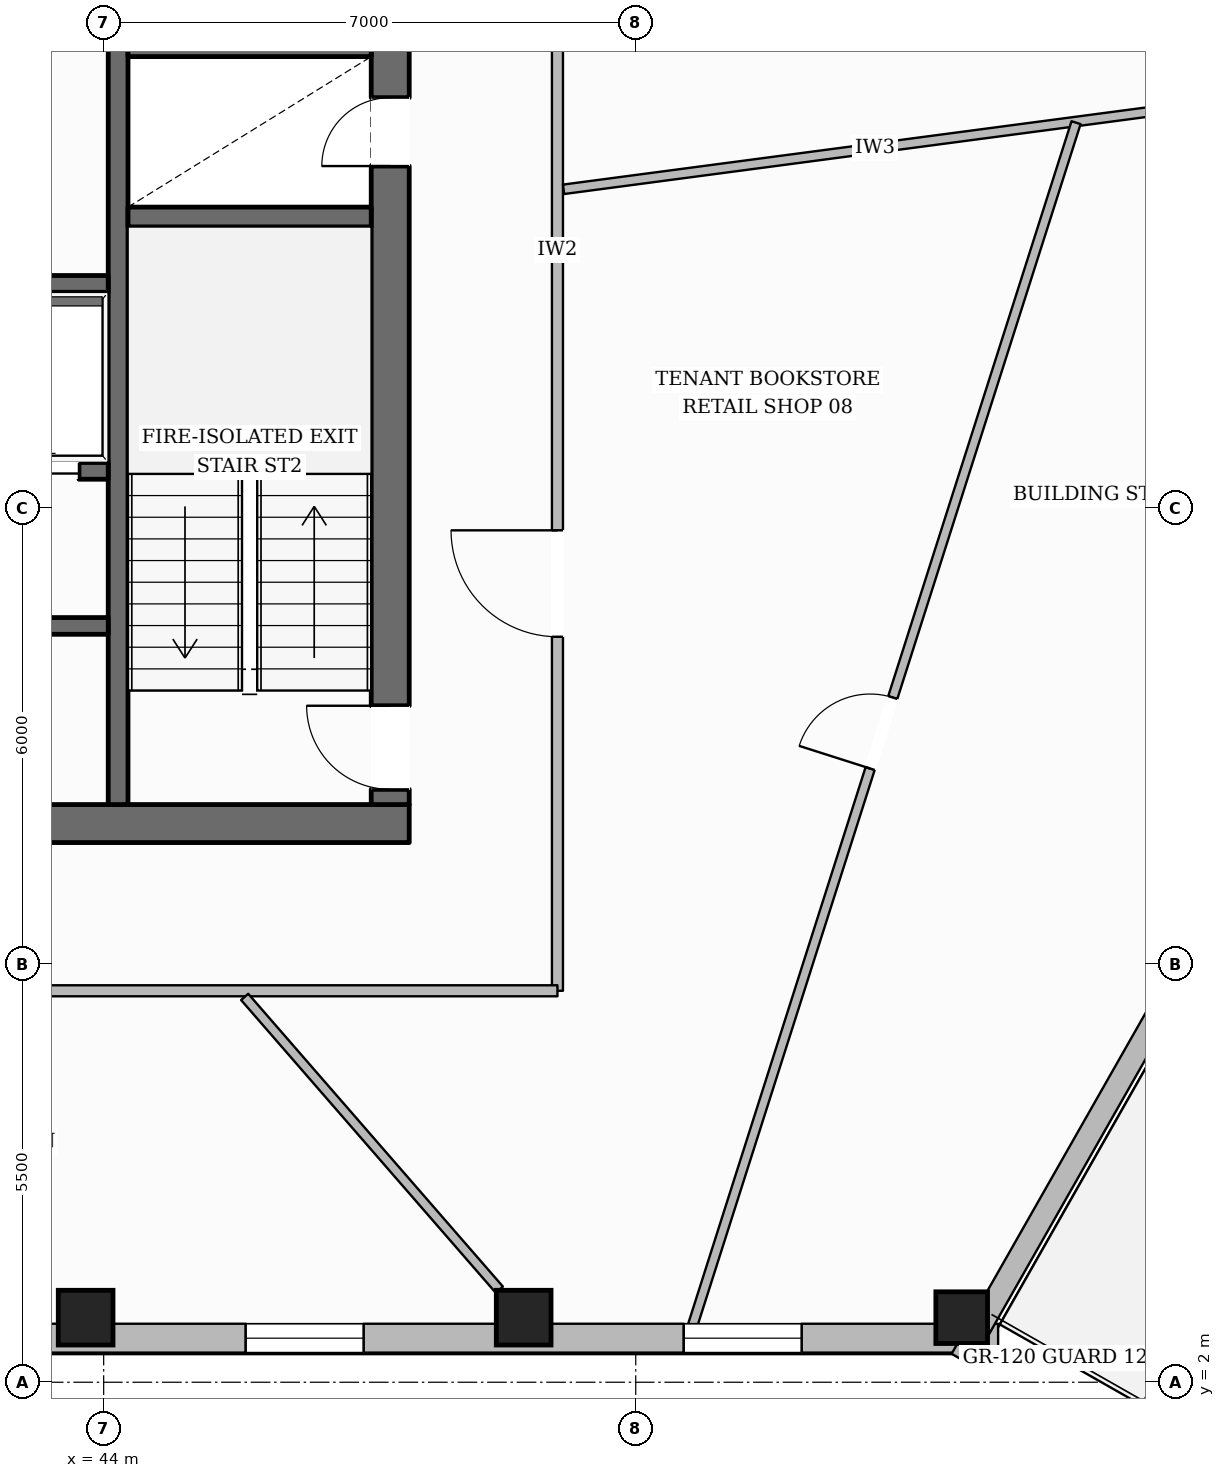
"""IFC4 building model, lengths in metres.
Left out: names, types, materials, properties, quantities, classifications, styles, units other than length and angle.
Written with IfcOpenShell. Run it as: python <this file> out.ifc"""

import sys

from ifc_helpers import new_model, si_unit, direction, frame, frame_2d, origin, origin_2d, place, context, subcontext, project, spatial, rectangle, hollow_rectangle, extrude, element, fill, save


model = new_model("IFC4")
c1 = context("Model", 3, precision=1e-05, world=origin(), true_north=direction((0.0, 1.0)))
c2 = subcontext(c1, "Body", "Model", "MODEL_VIEW")
j1 = project(units=[si_unit("LENGTHUNIT", "METRE"), si_unit("PLANEANGLEUNIT", "RADIAN")], contexts=[c1])
p1 = place(None, origin())
s1 = spatial("IfcSite", under=j1, at=p1, CompositionType="ELEMENT")
p2 = place(p1, origin())
s2 = spatial("IfcBuilding", under=s1, at=p2, CompositionType="ELEMENT")
p3 = place(p2, frame((0.0, 0.0, 93.2)))
s3 = spatial("IfcBuildingStorey", under=s2, at=p3, CompositionType="ELEMENT", Elevation=93.2)
p4 = place(p3, frame((27.98, 9.35, 0.0), z_axis=(0.0, 0.0, 1.0), x_axis=(1.0, 0.0, 0.0)))
e1 = element("IfcWall", 1, at=p4, inside=s3, PredefinedType="SOLIDWALL", context=c2, shape_type="SweptSolid", body=[
    extrude(rectangle(XDim=20.04, YDim=0.5, at=frame_2d((10.02, 0.0))), origin(), (0.0, 0.0, 1.0), 3.6),
])
p5 = place(p4, frame((10.52, 0.0, 0.0)))
e2 = element("IfcOpeningElement", 2, at=p5, cuts=e1, PredefinedType="OPENING", context=c2, shape_type="SweptSolid", body=[
    extrude(rectangle(XDim=1.4, YDim=2.2, at=frame_2d((0.7, 1.1))), frame((0.0, 0.26, 0.0), z_axis=(0.0, -1.0, 0.0), x_axis=(1.0, 0.0, 0.0)), (0.0, 0.0, 1.0), 0.52),
])
p6 = place(p3, frame((47.77, 9.6, 0.0), z_axis=(0.0, 0.0, 1.0), x_axis=(0.0, 1.0, 0.0)))
e3 = element("IfcWall", 3, at=p6, inside=s3, PredefinedType="SOLIDWALL", context=c2, shape_type="SweptSolid", body=[
    extrude(rectangle(XDim=13.0, YDim=0.5, at=frame_2d((6.5, 0.0))), origin(), (0.0, 0.0, 1.0), 3.6),
])
p7 = place(p6, frame((0.2, 0.0, 0.0)))
e4 = element("IfcOpeningElement", 4, at=p7, cuts=e3, PredefinedType="OPENING", context=c2, shape_type="SweptSolid", body=[
    extrude(rectangle(XDim=1.1, YDim=2.15, at=frame_2d((0.55, 1.075))), frame((0.0, 0.26, 0.0), z_axis=(0.0, -1.0, 0.0), x_axis=(1.0, 0.0, 0.0)), (0.0, 0.0, 1.0), 0.52),
])
p8 = place(p6, frame((8.4, 0.0, 0.0)))
e5 = element("IfcOpeningElement", 5, at=p8, cuts=e3, PredefinedType="OPENING", context=c2, shape_type="SweptSolid", body=[
    extrude(rectangle(XDim=0.9, YDim=2.1, at=frame_2d((0.45, 1.05))), frame((0.0, 0.26, 0.0), z_axis=(0.0, -1.0, 0.0), x_axis=(1.0, 0.0, 0.0)), (0.0, 0.0, 1.0), 0.52),
])
p9 = place(p3, frame((44.19, 9.6, 0.0), z_axis=(0.0, 0.0, 1.0), x_axis=(0.0, 1.0, 0.0)))
e6 = element("IfcWall", 6, at=p9, inside=s3, PredefinedType="SHEAR", context=c2, shape_type="SweptSolid", body=[
    extrude(rectangle(XDim=13.0, YDim=0.26, at=frame_2d((6.5, 0.0))), origin(), (0.0, 0.0, 1.0), 3.6),
])
p10 = place(p9, frame((10.925, 0.0, 0.0)))
e7 = element("IfcOpeningElement", 7, at=p10, cuts=e6, PredefinedType="OPENING", context=c2, shape_type="SweptSolid", body=[
    extrude(rectangle(XDim=1.25, YDim=2.25, at=frame_2d((0.625, 1.125))), frame((0.0, 0.14, 0.0), z_axis=(0.0, -1.0, 0.0), x_axis=(1.0, 0.0, 0.0)), (0.0, 0.0, 1.0), 0.28),
])
for number, where, z_axis, x_axis in (
    (8, (44.32, 17.33, 0.0), (0.0, 0.0, 1.0), (1.0, 0.0, 0.0)),
    (9, (44.32, 19.57, 0.0), (0.0, 0.0, 1.0), (1.0, 0.0, 0.0)),
):
    element("IfcWall", number, at=place(p3, frame(where, z_axis=z_axis, x_axis=x_axis)), inside=s3, PredefinedType="SHEAR", context=c2, shape_type="SweptSolid", body=[
        extrude(rectangle(XDim=3.2, YDim=0.26, at=frame_2d((1.6, 0.0))), origin(), (0.0, 0.0, 1.0), 3.6),
    ])
p11 = place(p3, frame((31.94, 16.45, 0.0), z_axis=(0.0, 0.0, 1.0), x_axis=(1.0, 0.0, 0.0)))
e10 = element("IfcWall", 10, at=p11, inside=s3, PredefinedType="SOLIDWALL", context=c2, shape_type="SweptSolid", body=[
    extrude(rectangle(XDim=12.12, YDim=0.22, at=frame_2d((6.06, 0.0))), origin(), (0.0, 0.0, 1.0), 3.6),
])
p12 = place(p3, frame((31.94, 13.99, 0.0), z_axis=(0.0, 0.0, 1.0), x_axis=(1.0, 0.0, 0.0)))
e11 = element("IfcWall", 11, at=p12, inside=s3, PredefinedType="SOLIDWALL", context=c2, shape_type="SweptSolid", body=[
    extrude(rectangle(XDim=12.12, YDim=0.22, at=frame_2d((6.06, 0.0))), origin(), (0.0, 0.0, 1.0), 3.6),
])
p13 = place(p12, frame((1.21, 0.0, 0.0)))
e12 = element("IfcOpeningElement", 12, at=p13, cuts=e11, PredefinedType="OPENING", context=c2, shape_type="SweptSolid", body=[
    extrude(rectangle(XDim=0.9, YDim=2.1, at=frame_2d((0.45, 1.05))), frame((0.0, 0.12, 0.0), z_axis=(0.0, -1.0, 0.0), x_axis=(1.0, 0.0, 0.0)), (0.0, 0.0, 1.0), 0.24),
])
p14 = place(p12, frame((4.31, 0.0, 0.0)))
e13 = element("IfcOpeningElement", 13, at=p14, cuts=e11, PredefinedType="OPENING", context=c2, shape_type="SweptSolid", body=[
    extrude(rectangle(XDim=0.9, YDim=2.1, at=frame_2d((0.45, 1.05))), frame((0.0, 0.12, 0.0), z_axis=(0.0, -1.0, 0.0), x_axis=(1.0, 0.0, 0.0)), (0.0, 0.0, 1.0), 0.24),
])
p15 = place(p12, frame((6.535, 0.0, 0.0)))
e14 = element("IfcOpeningElement", 14, at=p15, cuts=e11, PredefinedType="OPENING", context=c2, shape_type="SweptSolid", body=[
    extrude(rectangle(XDim=1.1, YDim=2.2, at=frame_2d((0.55, 1.1))), frame((0.0, 0.12, 0.0), z_axis=(0.0, -1.0, 0.0), x_axis=(1.0, 0.0, 0.0)), (0.0, 0.0, 1.0), 0.24),
])
p16 = place(p12, frame((8.585, 0.0, 0.0)))
e15 = element("IfcOpeningElement", 15, at=p16, cuts=e11, PredefinedType="OPENING", context=c2, shape_type="SweptSolid", body=[
    extrude(rectangle(XDim=1.1, YDim=2.2, at=frame_2d((0.55, 1.1))), frame((0.0, 0.12, 0.0), z_axis=(0.0, -1.0, 0.0), x_axis=(1.0, 0.0, 0.0)), (0.0, 0.0, 1.0), 0.24),
])
p17 = place(p12, frame((10.635, 0.0, 0.0)))
e16 = element("IfcOpeningElement", 16, at=p17, cuts=e11, PredefinedType="OPENING", context=c2, shape_type="SweptSolid", body=[
    extrude(rectangle(XDim=1.1, YDim=2.2, at=frame_2d((0.55, 1.1))), frame((0.0, 0.12, 0.0), z_axis=(0.0, -1.0, 0.0), x_axis=(1.0, 0.0, 0.0)), (0.0, 0.0, 1.0), 0.24),
])
p18 = place(p3, frame((40.28, 11.95, 0.0), z_axis=(0.0, 0.0, 1.0), x_axis=(1.0, 0.0, 0.0)))
e17 = element("IfcWall", 17, at=p18, inside=s3, PredefinedType="SOLIDWALL", context=c2, shape_type="SweptSolid", body=[
    extrude(rectangle(XDim=3.78, YDim=0.22, at=frame_2d((1.89, 0.0))), origin(), (0.0, 0.0, 1.0), 3.6),
])
p19 = place(p18, frame((1.55, 0.0, 0.0)))
e18 = element("IfcOpeningElement", 18, at=p19, cuts=e17, PredefinedType="OPENING", context=c2, shape_type="SweptSolid", body=[
    extrude(rectangle(XDim=0.9, YDim=2.1, at=frame_2d((0.45, 1.05))), frame((0.0, 0.12, 0.0), z_axis=(0.0, -1.0, 0.0), x_axis=(1.0, 0.0, 0.0)), (0.0, 0.0, 1.0), 0.24),
])
for number, where, z_axis, x_axis in (
    (19, (43.763, 2.85, 0.0), (0.0, 0.0, 1.0), (1.0, 0.0, 0.0)),
    (20, (49.526, 2.85, 0.0), (0.0, 0.0, 1.0), (1.0, 0.0, 0.0)),
):
    element("IfcColumn", number, at=place(p3, frame(where, z_axis=z_axis, x_axis=x_axis)), inside=s3, PredefinedType="COLUMN", context=c2, shape_type="SweptSolid", body=[
        extrude(hollow_rectangle(XDim=0.72, YDim=0.72, WallThickness=0.032, at=origin_2d()), origin(), (0.0, 0.0, 1.0), 3.6),
    ])
p20 = place(p3, frame((55.288, 2.85, 0.0), z_axis=(0.0, 0.0, 1.0), x_axis=(1.0, 0.0, 0.0)))
e21 = element("IfcColumn", 21, at=p20, inside=s3, PredefinedType="COLUMN", context=c2, shape_type="SweptSolid", body=[
    extrude(hollow_rectangle(XDim=0.68, YDim=0.68, WallThickness=0.03, at=origin_2d()), origin(), (0.0, 0.0, 1.0), 3.6),
])
p21 = place(p3, frame((55.768, 2.58, 0.0), z_axis=(0.0, 0.0, 1.0), x_axis=(-1.0, 0.0, 0.0)))
e22 = element("IfcWall", 22, at=p21, inside=s3, PredefinedType="STANDARD", context=c2, shape_type="SweptSolid", body=[
    extrude(rectangle(XDim=35.535, YDim=0.38, at=frame_2d((17.768, 0.0))), origin(), (0.0, 0.0, 1.0), 3.059),
])
p22 = place(p21, frame((31.399, 0.0, 0.65)))
e23 = element("IfcOpeningElement", 23, at=p22, cuts=e22, PredefinedType="OPENING", context=c2, shape_type="SweptSolid", body=[
    extrude(rectangle(XDim=1.55, YDim=1.75, at=frame_2d((0.775, 0.875))), frame((0.0, 0.2, 0.0), z_axis=(0.0, -1.0, 0.0), x_axis=(1.0, 0.0, 0.0)), (0.0, 0.0, 1.0), 0.4),
])
p23 = place(p21, frame((25.637, 0.0, 0.65)))
e24 = element("IfcOpeningElement", 24, at=p23, cuts=e22, PredefinedType="OPENING", context=c2, shape_type="SweptSolid", body=[
    extrude(rectangle(XDim=1.55, YDim=1.75, at=frame_2d((0.775, 0.875))), frame((0.0, 0.2, 0.0), z_axis=(0.0, -1.0, 0.0), x_axis=(1.0, 0.0, 0.0)), (0.0, 0.0, 1.0), 0.4),
])
p24 = place(p21, frame((14.111, 0.0, 0.65)))
e25 = element("IfcOpeningElement", 25, at=p24, cuts=e22, PredefinedType="OPENING", context=c2, shape_type="SweptSolid", body=[
    extrude(rectangle(XDim=1.55, YDim=1.75, at=frame_2d((0.775, 0.875))), frame((0.0, 0.2, 0.0), z_axis=(0.0, -1.0, 0.0), x_axis=(1.0, 0.0, 0.0)), (0.0, 0.0, 1.0), 0.4),
])
p25 = place(p21, frame((8.348, 0.0, 0.65)))
e26 = element("IfcOpeningElement", 26, at=p25, cuts=e22, PredefinedType="OPENING", context=c2, shape_type="SweptSolid", body=[
    extrude(rectangle(XDim=1.55, YDim=1.75, at=frame_2d((0.775, 0.875))), frame((0.0, 0.2, 0.0), z_axis=(0.0, -1.0, 0.0), x_axis=(1.0, 0.0, 0.0)), (0.0, 0.0, 1.0), 0.4),
])
p26 = place(p21, frame((2.585, 0.0, 0.65)))
e27 = element("IfcOpeningElement", 27, at=p26, cuts=e22, PredefinedType="OPENING", context=c2, shape_type="SweptSolid", body=[
    extrude(rectangle(XDim=1.55, YDim=1.75, at=frame_2d((0.775, 0.875))), frame((0.0, 0.2, 0.0), z_axis=(0.0, -1.0, 0.0), x_axis=(1.0, 0.0, 0.0)), (0.0, 0.0, 1.0), 0.4),
])
p27 = place(p3, frame((61.969, 14.041, 0.0), z_axis=(0.0, 0.0, 1.0), x_axis=(-0.494645467688, -0.869094851726, 0.0)))
e28 = element("IfcWall", 28, at=p27, inside=s3, PredefinedType="STANDARD", context=c2, shape_type="SweptSolid", body=[
    extrude(rectangle(XDim=13.51, YDim=0.3, at=frame_2d((6.755, 0.0))), origin(), (0.0, 0.0, 1.0), 3.059),
])
p28 = place(p27, frame((6.18, 0.0, 0.0)))
e29 = element("IfcOpeningElement", 29, at=p28, cuts=e28, PredefinedType="OPENING", context=c2, shape_type="SweptSolid", body=[
    extrude(rectangle(XDim=1.15, YDim=2.2, at=frame_2d((0.575, 1.1))), frame((0.0, 0.16, 0.0), z_axis=(0.0, -1.0, 0.0), x_axis=(1.0, 0.0, 0.0)), (0.0, 0.0, 1.0), 0.32),
])
p29 = place(p3, frame((44.203, 44.699, 0.0), z_axis=(0.0, 0.0, 1.0), x_axis=(0.494642620698, -0.869096472084, 0.0)))
e30 = element("IfcWall", 30, at=p29, inside=s3, PredefinedType="STANDARD", context=c2, shape_type="SweptSolid", body=[
    extrude(rectangle(XDim=35.916, YDim=0.38, at=frame_2d((17.958, 0.0))), origin(), (0.0, 0.0, 1.0), 3.059),
])
p30 = place(p29, frame((31.754, 0.0, 0.65)))
e31 = element("IfcOpeningElement", 31, at=p30, cuts=e30, PredefinedType="OPENING", context=c2, shape_type="SweptSolid", body=[
    extrude(rectangle(XDim=1.55, YDim=1.75, at=frame_2d((0.775, 0.875))), frame((0.0, 0.2, 0.0), z_axis=(0.0, -1.0, 0.0), x_axis=(1.0, 0.0, 0.0)), (0.0, 0.0, 1.0), 0.4),
])
p31 = place(p29, frame((25.927, 0.0, 0.65)))
e32 = element("IfcOpeningElement", 32, at=p31, cuts=e30, PredefinedType="OPENING", context=c2, shape_type="SweptSolid", body=[
    extrude(rectangle(XDim=1.55, YDim=1.75, at=frame_2d((0.775, 0.875))), frame((0.0, 0.2, 0.0), z_axis=(0.0, -1.0, 0.0), x_axis=(1.0, 0.0, 0.0)), (0.0, 0.0, 1.0), 0.4),
])
p32 = place(p29, frame((14.272, 0.0, 0.65)))
e33 = element("IfcOpeningElement", 33, at=p32, cuts=e30, PredefinedType="OPENING", context=c2, shape_type="SweptSolid", body=[
    extrude(rectangle(XDim=1.55, YDim=1.75, at=frame_2d((0.775, 0.875))), frame((0.0, 0.2, 0.0), z_axis=(0.0, -1.0, 0.0), x_axis=(1.0, 0.0, 0.0)), (0.0, 0.0, 1.0), 0.4),
])
p33 = place(p29, frame((8.445, 0.0, 0.65)))
e34 = element("IfcOpeningElement", 34, at=p33, cuts=e30, PredefinedType="OPENING", context=c2, shape_type="SweptSolid", body=[
    extrude(rectangle(XDim=1.55, YDim=1.75, at=frame_2d((0.775, 0.875))), frame((0.0, 0.2, 0.0), z_axis=(0.0, -1.0, 0.0), x_axis=(1.0, 0.0, 0.0)), (0.0, 0.0, 1.0), 0.4),
])
p34 = place(p29, frame((2.618, 0.0, 0.65)))
e35 = element("IfcOpeningElement", 35, at=p34, cuts=e30, PredefinedType="OPENING", context=c2, shape_type="SweptSolid", body=[
    extrude(rectangle(XDim=1.55, YDim=1.75, at=frame_2d((0.775, 0.875))), frame((0.0, 0.2, 0.0), z_axis=(0.0, -1.0, 0.0), x_axis=(1.0, 0.0, 0.0)), (0.0, 0.0, 1.0), 0.4),
])
p35 = place(p3, frame((49.97, 7.15, 0.0), z_axis=(0.0, 0.0, 1.0), x_axis=(0.0, 1.0, 0.0)))
e36 = element("IfcWall", 36, at=p35, inside=s3, PredefinedType="PARTITIONING", context=c2, shape_type="SweptSolid", body=[
    extrude(rectangle(XDim=17.9, YDim=0.145, at=frame_2d((8.95, 0.0))), origin(), (0.0, 0.0, 1.0), 3.288),
])
p36 = place(p35, frame((13.437, 0.0, 0.0)))
e37 = element("IfcOpeningElement", 37, at=p36, cuts=e36, PredefinedType="OPENING", context=c2, shape_type="SweptSolid", body=[
    extrude(rectangle(XDim=1.4, YDim=2.2, at=frame_2d((0.7, 1.1))), frame((0.0, 0.083, 0.0), z_axis=(0.0, -1.0, 0.0), x_axis=(1.0, 0.0, 0.0)), (0.0, 0.0, 1.0), 0.165),
])
p37 = place(p35, frame((4.658, 0.0, 0.0)))
e38 = element("IfcOpeningElement", 38, at=p37, cuts=e36, PredefinedType="OPENING", context=c2, shape_type="SweptSolid", body=[
    extrude(rectangle(XDim=1.4, YDim=2.2, at=frame_2d((0.7, 1.1))), frame((0.0, 0.083, 0.0), z_axis=(0.0, -1.0, 0.0), x_axis=(1.0, 0.0, 0.0)), (0.0, 0.0, 1.0), 0.165),
])
p38 = place(p3, frame((26.03, 7.15, 0.0), z_axis=(0.0, 0.0, 1.0), x_axis=(1.0, 0.0, 0.0)))
e39 = element("IfcWall", 39, at=p38, inside=s3, PredefinedType="PARTITIONING", context=c2, shape_type="SweptSolid", body=[
    extrude(rectangle(XDim=23.94, YDim=0.145, at=frame_2d((11.97, 0.0))), origin(), (0.0, 0.0, 1.0), 3.6),
])
p39 = place(p38, frame((11.27, 0.0, 0.0)))
e40 = element("IfcOpeningElement", 40, at=p39, cuts=e39, PredefinedType="OPENING", context=c2, shape_type="SweptSolid", body=[
    extrude(rectangle(XDim=1.4, YDim=2.2, at=frame_2d((0.7, 1.1))), frame((0.0, 0.083, 0.0), z_axis=(0.0, -1.0, 0.0), x_axis=(1.0, 0.0, 0.0)), (0.0, 0.0, 1.0), 0.165),
])
p40 = place(p3, frame((50.051, 17.694, 0.0), z_axis=(0.0, 0.0, 1.0), x_axis=(0.991361202235, 0.131160080446, 0.0)))
e41 = element("IfcWall", 41, at=p40, inside=s3, PredefinedType="PARTITIONING", context=c2, shape_type="SweptSolid", body=[
    extrude(rectangle(XDim=8.27, YDim=0.125, at=frame_2d((4.135, 0.0))), origin(), (0.0, 0.0, 1.0), 3.141),
])
p41 = place(p3, frame((45.855, 7.07, 0.0), z_axis=(0.0, 0.0, 1.0), x_axis=(0.656311309617, -0.75449020197, 0.0)))
e42 = element("IfcWall", 42, at=p41, inside=s3, PredefinedType="PARTITIONING", context=c2, shape_type="SweptSolid", body=[
    extrude(rectangle(XDim=5.105, YDim=0.125, at=frame_2d((2.553, 0.0))), origin(), (0.0, 0.0, 1.0), 3.6),
])
p42 = place(p3, frame((51.743, 2.73, 0.0), z_axis=(0.0, 0.0, 1.0), x_axis=(0.303729685162, 0.95275824759, 0.0)))
e43 = element("IfcWall", 43, at=p42, inside=s3, PredefinedType="PARTITIONING", context=c2, shape_type="SweptSolid", body=[
    extrude(rectangle(XDim=16.627, YDim=0.125, at=frame_2d((8.313, 0.0))), origin(), (0.0, 0.0, 1.0), 3.6),
])
p43 = place(p42, frame((7.709, 0.0, 0.0)))
e44 = element("IfcOpeningElement", 44, at=p43, cuts=e43, PredefinedType="OPENING", context=c2, shape_type="SweptSolid", body=[
    extrude(rectangle(XDim=0.98, YDim=2.15, at=frame_2d((0.49, 1.075))), frame((0.0, 0.073, 0.0), z_axis=(0.0, -1.0, 0.0), x_axis=(1.0, 0.0, 0.0)), (0.0, 0.0, 1.0), 0.145),
])
p44 = place(p25, origin())
e45 = element("IfcWindow", 45, at=p44, inside=s3, PartitioningType="SINGLE_PANEL", PredefinedType="WINDOW", context=c2, shape_type="SweptSolid", body=[
    extrude(rectangle(XDim=1.55, YDim=1.75, at=frame_2d((0.775, 0.875))), frame((0.0, 0.03, 0.0), z_axis=(0.0, -1.0, 0.0), x_axis=(1.0, 0.0, 0.0)), (0.0, 0.0, 1.0), 0.06),
])
fill(e26, e45)
p45 = place(p26, origin())
e46 = element("IfcWindow", 46, at=p45, inside=s3, PartitioningType="SINGLE_PANEL", PredefinedType="WINDOW", context=c2, shape_type="SweptSolid", body=[
    extrude(rectangle(XDim=1.55, YDim=1.75, at=frame_2d((0.775, 0.875))), frame((0.0, 0.03, 0.0), z_axis=(0.0, -1.0, 0.0), x_axis=(1.0, 0.0, 0.0)), (0.0, 0.0, 1.0), 0.06),
])
fill(e27, e46)
p46 = place(p7, origin())
e47 = element("IfcDoor", 47, at=p46, inside=s3, OperationType="SINGLE_SWING_RIGHT", PredefinedType="DOOR", context=c2, shape_type="SweptSolid", body=[
    extrude(rectangle(XDim=1.1, YDim=2.15, at=frame_2d((0.55, 1.075))), frame((0.0, 0.025, 0.0), z_axis=(0.0, -1.0, 0.0), x_axis=(1.0, 0.0, 0.0)), (0.0, 0.0, 1.0), 0.05),
])
fill(e4, e47)
p47 = place(p8, origin())
e48 = element("IfcDoor", 48, at=p47, inside=s3, OperationType="SINGLE_SWING_LEFT", PredefinedType="DOOR", context=c2, shape_type="SweptSolid", body=[
    extrude(rectangle(XDim=0.9, YDim=2.1, at=frame_2d((0.45, 1.05))), frame((0.0, 0.025, 0.0), z_axis=(0.0, -1.0, 0.0), x_axis=(1.0, 0.0, 0.0)), (0.0, 0.0, 1.0), 0.05),
])
fill(e5, e48)
p48 = place(p17, origin())
e49 = element("IfcDoor", 49, at=p48, inside=s3, OperationType="DOUBLE_DOOR_SLIDING", PredefinedType="DOOR", context=c2, shape_type="SweptSolid", body=[
    extrude(rectangle(XDim=1.1, YDim=2.2, at=frame_2d((0.55, 1.1))), frame((0.0, 0.025, 0.0), z_axis=(0.0, -1.0, 0.0), x_axis=(1.0, 0.0, 0.0)), (0.0, 0.0, 1.0), 0.05),
])
fill(e16, e49)
p49 = place(p37, origin())
e50 = element("IfcDoor", 50, at=p49, inside=s3, OperationType="SINGLE_SWING_RIGHT", PredefinedType="DOOR", context=c2, shape_type="SweptSolid", body=[
    extrude(rectangle(XDim=1.4, YDim=2.2, at=frame_2d((0.7, 1.1))), frame((0.0, 0.025, 0.0), z_axis=(0.0, -1.0, 0.0), x_axis=(1.0, 0.0, 0.0)), (0.0, 0.0, 1.0), 0.05),
])
fill(e38, e50)
p50 = place(p43, origin())
e51 = element("IfcDoor", 51, at=p50, inside=s3, OperationType="SINGLE_SWING_LEFT", PredefinedType="DOOR", context=c2, shape_type="SweptSolid", body=[
    extrude(rectangle(XDim=0.98, YDim=2.15, at=frame_2d((0.49, 1.075))), frame((0.0, 0.025, 0.0), z_axis=(0.0, -1.0, 0.0), x_axis=(1.0, 0.0, 0.0)), (0.0, 0.0, 1.0), 0.05),
])
fill(e44, e51)
save(model, sys.argv[1])
